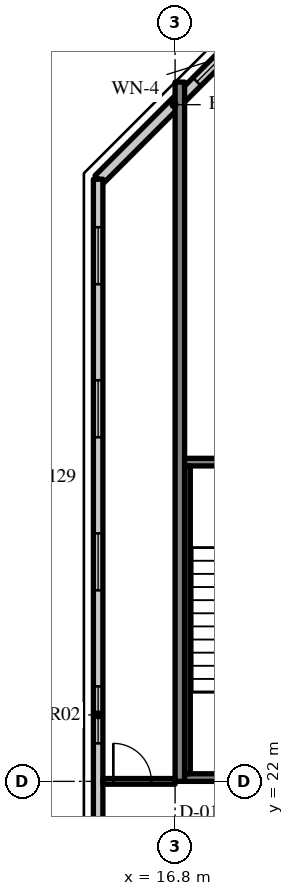
"""IFC4 building model, lengths in metres.
Left out: names, types, materials, properties, quantities, classifications, styles, units other than length and angle.
Written with IfcOpenShell. Run it as: python <this file> out.ifc"""

import sys

from ifc_helpers import new_model, si_unit, direction, frame, frame_2d, origin, place, context, subcontext, project, spatial, rectangle, extrude, source, transform, mapped, element, fill, save


model = new_model("IFC4")
c1 = context("Model", 3, precision=1e-05, world=origin(), true_north=direction((0.0, 1.0)))
c2 = subcontext(c1, "Body", "Model", "MODEL_VIEW")
j1 = project(units=[si_unit("LENGTHUNIT", "METRE"), si_unit("PLANEANGLEUNIT", "RADIAN")], contexts=[c1])
p1 = place(None, origin())
s1 = spatial("IfcSite", under=j1, at=p1, CompositionType="ELEMENT")
p2 = place(p1, origin())
s2 = spatial("IfcBuilding", under=s1, at=p2, CompositionType="ELEMENT")
p3 = place(p2, frame((0.0, 0.0, 297.7)))
s3 = spatial("IfcBuildingStorey", under=s2, at=p3, CompositionType="ELEMENT", Elevation=297.7)
m1 = source(origin(), c2, "Body", "SweptSolid", [
    extrude(rectangle(XDim=18.4, YDim=0.25, at=frame_2d((9.2, 0.0))), origin(), (0.0, 0.0, 1.0), 3.72),
])
p4 = place(p3, frame((16.925, 22.0, 0.0), z_axis=(0.0, 0.0, 1.0), x_axis=(0.0, 1.0, 0.0)))
e1 = element("IfcWall", 1, at=p4, inside=s3, PredefinedType="SHEAR", context=c2, shape_type="MappedRepresentation", body=[
    mapped(m1, transform((0.0, 0.0, 0.0), scale=1.0)),
])
m2 = source(origin(), c2, "Body", "SweptSolid", [
    extrude(rectangle(XDim=5.576, YDim=0.3, at=frame_2d((2.788, 0.0))), origin(), (0.0, 0.0, 1.0), 3.72),
])
p5 = place(p3, frame((18.743, 41.777, 0.0), z_axis=(0.0, 0.0, 1.0), x_axis=(-0.707106781187, -0.707106781187, 0.0)))
e2 = element("IfcWall", 2, at=p5, inside=s3, PredefinedType="SOLIDWALL", context=c2, shape_type="MappedRepresentation", body=[
    mapped(m2, transform((0.0, 0.0, 0.0), scale=1.0)),
])
m3 = source(origin(), c2, "Body", "SweptSolid", [
    extrude(rectangle(XDim=1.8, YDim=1.5, at=frame_2d((0.9, 0.75))), frame((0.0, 0.16, 0.0), z_axis=(0.0, -1.0, 0.0), x_axis=(1.0, 0.0, 0.0)), (0.0, 0.0, 1.0), 0.32),
])
p6 = place(p5, frame((0.135, 0.0, 0.9)))
e3 = element("IfcOpeningElement", 3, at=p6, cuts=e2, PredefinedType="OPENING", context=c2, shape_type="MappedRepresentation", body=[
    mapped(m3, transform((0.0, 0.0, 0.0), scale=1.0)),
])
m4 = source(origin(), c2, "Body", "SweptSolid", [
    extrude(rectangle(XDim=28.189, YDim=0.25, at=frame_2d((14.095, 0.0))), origin(), (0.0, 0.0, 1.0), 3.72),
])
p7 = place(p3, frame((14.775, 37.845, 0.0), z_axis=(0.0, 0.0, 1.0), x_axis=(0.0, -1.0, 0.0)))
e4 = element("IfcWall", 4, at=p7, inside=s3, PredefinedType="SOLIDWALL", context=c2, shape_type="MappedRepresentation", body=[
    mapped(m4, transform((0.0, 0.0, 0.0), scale=1.0)),
])
m5 = source(origin(), c2, "Body", "SweptSolid", [
    extrude(rectangle(XDim=1.5, YDim=1.5, at=frame_2d((0.75, 0.75))), frame((0.0, 0.135, 0.0), z_axis=(0.0, -1.0, 0.0), x_axis=(1.0, 0.0, 0.0)), (0.0, 0.0, 1.0), 0.27),
])
p8 = place(p7, frame((1.263, 0.0, 0.9)))
e5 = element("IfcOpeningElement", 5, at=p8, cuts=e4, PredefinedType="OPENING", context=c2, shape_type="MappedRepresentation", body=[
    mapped(m5, transform((0.0, 0.0, 0.0), scale=1.0)),
])
p9 = place(p7, frame((5.291, 0.0, 0.9)))
e6 = element("IfcOpeningElement", 6, at=p9, cuts=e4, PredefinedType="OPENING", context=c2, shape_type="MappedRepresentation", body=[
    mapped(m5, transform((0.0, 0.0, 0.0), scale=1.0)),
])
p10 = place(p7, frame((9.318, 0.0, 0.9)))
e7 = element("IfcOpeningElement", 7, at=p10, cuts=e4, PredefinedType="OPENING", context=c2, shape_type="MappedRepresentation", body=[
    mapped(m5, transform((0.0, 0.0, 0.0), scale=1.0)),
])
p11 = place(p7, frame((13.345, 0.0, 0.9)))
e8 = element("IfcOpeningElement", 8, at=p11, cuts=e4, PredefinedType="OPENING", context=c2, shape_type="MappedRepresentation", body=[
    mapped(m5, transform((0.0, 0.0, 0.0), scale=1.0)),
])
p12 = place(p7, frame((17.372, 0.0, 0.9)))
e9 = element("IfcOpeningElement", 9, at=p12, cuts=e4, PredefinedType="OPENING", context=c2, shape_type="MappedRepresentation", body=[
    mapped(m5, transform((0.0, 0.0, 0.0), scale=1.0)),
])
p13 = place(p7, frame((21.399, 0.0, 0.9)))
e10 = element("IfcOpeningElement", 10, at=p13, cuts=e4, PredefinedType="OPENING", context=c2, shape_type="MappedRepresentation", body=[
    mapped(m5, transform((0.0, 0.0, 0.0), scale=1.0)),
])
p14 = place(p7, frame((25.426, 0.0, 0.9)))
e11 = element("IfcOpeningElement", 11, at=p14, cuts=e4, PredefinedType="OPENING", context=c2, shape_type="MappedRepresentation", body=[
    mapped(m5, transform((0.0, 0.0, 0.0), scale=1.0)),
])
m6 = source(origin(), c2, "Body", "SweptSolid", [
    extrude(rectangle(XDim=8.15, YDim=0.2, at=frame_2d((4.075, 0.0))), origin(), (0.0, 0.0, 1.0), 3.72),
])
p15 = place(p3, frame((17.05, 22.1, 0.0), z_axis=(0.0, 0.0, 1.0), x_axis=(1.0, 0.0, 0.0)))
e12 = element("IfcWall", 12, at=p15, inside=s3, PredefinedType="SOLIDWALL", context=c2, shape_type="MappedRepresentation", body=[
    mapped(m6, transform((0.0, 0.0, 0.0), scale=1.0)),
])
m7 = source(origin(), c2, "Body", "SweptSolid", [
    extrude(rectangle(XDim=1.2, YDim=2.1, at=frame_2d((0.6, 1.05))), frame((0.0, 0.11, 0.0), z_axis=(0.0, -1.0, 0.0), x_axis=(1.0, 0.0, 0.0)), (0.0, 0.0, 1.0), 0.22),
])
p16 = place(p15, frame((5.95, 0.0, 0.0)))
e13 = element("IfcOpeningElement", 13, at=p16, cuts=e12, PredefinedType="OPENING", context=c2, shape_type="MappedRepresentation", body=[
    mapped(m7, transform((0.0, 0.0, 0.0), scale=1.0)),
])
p17 = place(p3, frame((17.05, 30.4, 0.0), z_axis=(0.0, 0.0, 1.0), x_axis=(1.0, 0.0, 0.0)))
e14 = element("IfcWall", 14, at=p17, inside=s3, PredefinedType="SOLIDWALL", context=c2, shape_type="MappedRepresentation", body=[
    mapped(m6, transform((0.0, 0.0, 0.0), scale=1.0)),
])
m8 = source(origin(), c2, "Body", "SweptSolid", [
    extrude(rectangle(XDim=1.0, YDim=2.1, at=frame_2d((0.5, 1.05))), frame((0.0, 0.11, 0.0), z_axis=(0.0, -1.0, 0.0), x_axis=(1.0, 0.0, 0.0)), (0.0, 0.0, 1.0), 0.22),
])
p18 = place(p17, frame((6.05, 0.0, 0.0)))
e15 = element("IfcOpeningElement", 15, at=p18, cuts=e14, PredefinedType="OPENING", context=c2, shape_type="MappedRepresentation", body=[
    mapped(m8, transform((0.0, 0.0, 0.0), scale=1.0)),
])
m9 = source(origin(), c2, "Body", "SweptSolid", [
    extrude(rectangle(XDim=8.1, YDim=0.15, at=frame_2d((4.05, 0.0))), origin(), (0.0, 0.0, 1.0), 3.72),
])
p19 = place(p3, frame((17.125, 22.2, 0.0), z_axis=(0.0, 0.0, 1.0), x_axis=(0.0, 1.0, 0.0)))
e16 = element("IfcWall", 16, at=p19, inside=s3, PredefinedType="SOLIDWALL", context=c2, shape_type="MappedRepresentation", body=[
    mapped(m9, transform((0.0, 0.0, 0.0), scale=1.0)),
])
m10 = source(origin(), c2, "Body", "SweptSolid", [
    extrude(rectangle(XDim=1.9, YDim=0.15, at=frame_2d((0.95, 0.0))), origin(), (0.0, 0.0, 1.0), 3.02),
])
p20 = place(p3, frame((14.9, 22.0, 0.0), z_axis=(0.0, 0.0, 1.0), x_axis=(1.0, 0.0, 0.0)))
e17 = element("IfcWall", 17, at=p20, inside=s3, PredefinedType="PARTITIONING", context=c2, shape_type="MappedRepresentation", body=[
    mapped(m10, transform((0.0, 0.0, 0.0), scale=1.0)),
])
m11 = source(origin(), c2, "Body", "SweptSolid", [
    extrude(rectangle(XDim=1.0, YDim=2.1, at=frame_2d((0.5, 1.05))), frame((0.0, 0.085, 0.0), z_axis=(0.0, -1.0, 0.0), x_axis=(1.0, 0.0, 0.0)), (0.0, 0.0, 1.0), 0.17),
])
p21 = place(p20, frame((0.275, 0.0, 0.0)))
e18 = element("IfcOpeningElement", 18, at=p21, cuts=e17, PredefinedType="OPENING", context=c2, shape_type="MappedRepresentation", body=[
    mapped(m11, transform((0.0, 0.0, 0.0), scale=1.0)),
])
m12 = source(origin(), c2, "Body", "SweptSolid", [
    extrude(rectangle(XDim=1.8, YDim=1.5, at=frame_2d((0.9, 0.75))), frame((0.0, 0.03, 0.0), z_axis=(0.0, -1.0, 0.0), x_axis=(1.0, 0.0, 0.0)), (0.0, 0.0, 1.0), 0.06),
])
p22 = place(p6, origin())
e19 = element("IfcWindow", 19, at=p22, inside=s3, PartitioningType="SINGLE_PANEL", PredefinedType="WINDOW", context=c2, shape_type="MappedRepresentation", body=[
    mapped(m12, transform((0.0, 0.0, 0.0), scale=1.0)),
])
fill(e3, e19)
m13 = source(origin(), c2, "Body", "SweptSolid", [
    extrude(rectangle(XDim=1.5, YDim=1.5, at=frame_2d((0.75, 0.75))), frame((0.0, 0.03, 0.0), z_axis=(0.0, -1.0, 0.0), x_axis=(1.0, 0.0, 0.0)), (0.0, 0.0, 1.0), 0.06),
])
p23 = place(p8, origin())
e20 = element("IfcWindow", 20, at=p23, inside=s3, PartitioningType="SINGLE_PANEL", PredefinedType="WINDOW", context=c2, shape_type="MappedRepresentation", body=[
    mapped(m13, transform((0.0, 0.0, 0.0), scale=1.0)),
])
fill(e5, e20)
p24 = place(p9, origin())
e21 = element("IfcWindow", 21, at=p24, inside=s3, PartitioningType="SINGLE_PANEL", PredefinedType="WINDOW", context=c2, shape_type="MappedRepresentation", body=[
    mapped(m13, transform((0.0, 0.0, 0.0), scale=1.0)),
])
fill(e6, e21)
p25 = place(p10, origin())
e22 = element("IfcWindow", 22, at=p25, inside=s3, PartitioningType="SINGLE_PANEL", PredefinedType="WINDOW", context=c2, shape_type="MappedRepresentation", body=[
    mapped(m13, transform((0.0, 0.0, 0.0), scale=1.0)),
])
fill(e7, e22)
p26 = place(p11, origin())
e23 = element("IfcWindow", 23, at=p26, inside=s3, PartitioningType="SINGLE_PANEL", PredefinedType="WINDOW", context=c2, shape_type="MappedRepresentation", body=[
    mapped(m13, transform((0.0, 0.0, 0.0), scale=1.0)),
])
fill(e8, e23)
m14 = source(origin(), c2, "Body", "SweptSolid", [
    extrude(rectangle(XDim=1.0, YDim=2.1, at=frame_2d((0.5, 1.05))), frame((0.0, 0.025, 0.0), z_axis=(0.0, -1.0, 0.0), x_axis=(1.0, 0.0, 0.0)), (0.0, 0.0, 1.0), 0.05),
])
p27 = place(p21, origin())
e24 = element("IfcDoor", 24, at=p27, inside=s3, OperationType="SINGLE_SWING_LEFT", PredefinedType="DOOR", context=c2, shape_type="MappedRepresentation", body=[
    mapped(m14, transform((0.0, 0.0, 0.0), scale=1.0)),
])
fill(e18, e24)
save(model, sys.argv[1])
